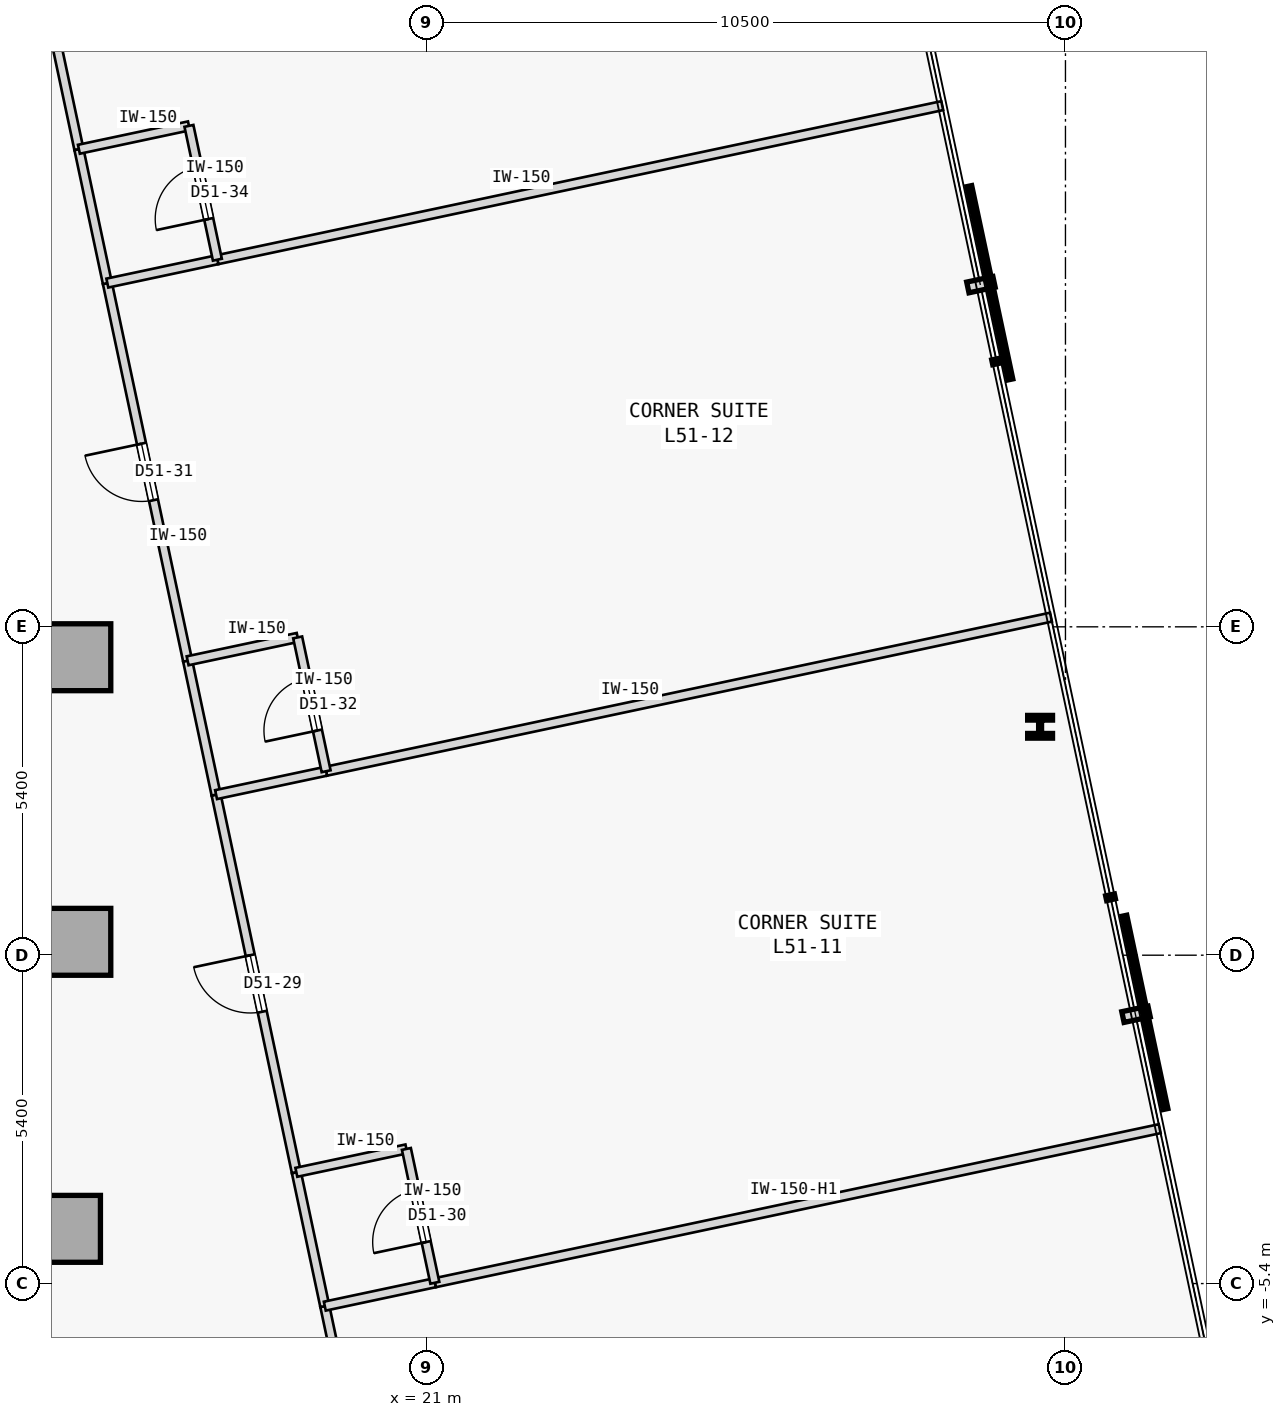
"""IFC4 building model, lengths in metres.
Left out: names, types, materials, properties, quantities, classifications, styles, units other than length and angle.
Written with IfcOpenShell. Run it as: python <this file> out.ifc"""

import sys

from ifc_helpers import new_model, si_unit, direction, frame, frame_2d, origin, origin_2d, place, context, subcontext, project, spatial, rectangle, i_section, extrude, element, fill, save


model = new_model("IFC4")
c1 = context("Model", 3, precision=1e-05, world=origin(), true_north=direction((0.0, 1.0)))
c2 = subcontext(c1, "Body", "Model", "MODEL_VIEW")
j1 = project(units=[si_unit("LENGTHUNIT", "METRE"), si_unit("PLANEANGLEUNIT", "RADIAN")], contexts=[c1])
p1 = place(None, origin())
s1 = spatial("IfcSite", under=j1, at=p1, CompositionType="ELEMENT")
p2 = place(p1, origin())
s2 = spatial("IfcBuilding", under=s1, at=p2, CompositionType="ELEMENT")
p3 = place(p2, frame((0.0, 0.0, 195.6)))
s3 = spatial("IfcBuildingStorey", under=s2, at=p3, CompositionType="ELEMENT", Elevation=195.6)
for number, where, z_axis, x_axis in (
    (1, (15.25, 4.9, 0.0), (0.0, 0.0, 1.0), (1.0, 0.0, 0.0)),
    (2, (15.25, 0.22, 0.0), (0.0, 0.0, 1.0), (1.0, 0.0, 0.0)),
    (3, (15.08, -4.5, 0.0), (0.0, 0.0, 1.0), (1.0, 0.0, 0.0)),
):
    element("IfcColumn", number, at=place(p3, frame(where, z_axis=z_axis, x_axis=x_axis)), inside=s3, PredefinedType="COLUMN", context=c2, shape_type="SweptSolid", body=[
        extrude(rectangle(XDim=1.1, YDim=1.1, at=origin_2d()), origin(), (0.0, 0.0, 1.0), 3.4),
    ])
p4 = place(p3, frame((31.083, 3.756, 0.0), z_axis=(0.0, 0.0, 1.0), x_axis=(1.0, 0.0, 0.0)))
e4 = element("IfcColumn", 4, at=p4, inside=s3, PredefinedType="COLUMN", context=c2, shape_type="SweptSolid", body=[
    extrude(i_section(OverallWidth=0.409, OverallDepth=0.374, WebThickness=0.048, FlangeThickness=0.077, FilletRadius=0.015, at=origin_2d()), origin(), (0.0, 0.0, 1.0), 3.4),
])
p5 = place(p3, frame((20.328, -10.515, 0.0), z_axis=(0.0, 0.0, 1.0), x_axis=(-0.207950868925, 0.97813927235, 0.0)))
e5 = element("IfcWall", 5, at=p5, inside=s3, PredefinedType="PARTITIONING", context=c2, shape_type="SweptSolid", body=[
    extrude(rectangle(XDim=4.85, YDim=0.15, at=frame_2d((2.425, 0.0))), origin(), (0.0, 0.0, 1.0), 3.175),
])
p6 = place(p5, frame((1.95, 0.0, 0.0)))
e6 = element("IfcOpeningElement", 6, at=p6, cuts=e5, PredefinedType="OPENING", context=c2, shape_type="SweptSolid", body=[
    extrude(rectangle(XDim=0.95, YDim=2.15, at=frame_2d((0.475, 1.075))), frame((0.0, 0.085, 0.0), z_axis=(0.0, -1.0, 0.0), x_axis=(1.0, 0.0, 0.0)), (0.0, 0.0, 1.0), 0.17),
])
p7 = place(p3, frame((18.852, -3.571, 0.0), z_axis=(0.0, 0.0, 1.0), x_axis=(-0.207879907349, 0.978154355979, 0.0)))
e7 = element("IfcWall", 7, at=p7, inside=s3, PredefinedType="PARTITIONING", context=c2, shape_type="SweptSolid", body=[
    extrude(rectangle(XDim=6.35, YDim=0.15, at=frame_2d((3.175, 0.0))), origin(), (0.0, 0.0, 1.0), 3.175),
])
p8 = place(p7, frame((2.7, 0.0, 0.0)))
e8 = element("IfcOpeningElement", 8, at=p8, cuts=e7, PredefinedType="OPENING", context=c2, shape_type="SweptSolid", body=[
    extrude(rectangle(XDim=0.95, YDim=2.15, at=frame_2d((0.475, 1.075))), frame((0.0, 0.085, 0.0), z_axis=(0.0, -1.0, 0.0), x_axis=(1.0, 0.0, 0.0)), (0.0, 0.0, 1.0), 0.17),
])
p9 = place(p3, frame((19.32, -5.771, 0.0), z_axis=(0.0, 0.0, 1.0), x_axis=(-0.207913264065, 0.978147266328, 0.0)))
e9 = element("IfcWall", 9, at=p9, inside=s3, PredefinedType="PARTITIONING", context=c2, shape_type="SweptSolid", body=[
    extrude(rectangle(XDim=2.25, YDim=0.15, at=frame_2d((1.125, 0.0))), origin(), (0.0, 0.0, 1.0), 3.175),
])
p10 = place(p3, frame((17.064, 4.841, 0.0), z_axis=(0.0, 0.0, 1.0), x_axis=(-0.207924511115, 0.978144875608, 0.0)))
e10 = element("IfcWall", 10, at=p10, inside=s3, PredefinedType="PARTITIONING", context=c2, shape_type="SweptSolid", body=[
    extrude(rectangle(XDim=6.35, YDim=0.15, at=frame_2d((3.175, 0.0))), origin(), (0.0, 0.0, 1.0), 3.175),
])
p11 = place(p10, frame((2.7, 0.0, 0.0)))
e11 = element("IfcOpeningElement", 11, at=p11, cuts=e10, PredefinedType="OPENING", context=c2, shape_type="SweptSolid", body=[
    extrude(rectangle(XDim=0.95, YDim=2.15, at=frame_2d((0.475, 1.075))), frame((0.0, 0.085, 0.0), z_axis=(0.0, -1.0, 0.0), x_axis=(1.0, 0.0, 0.0)), (0.0, 0.0, 1.0), 0.17),
])
p12 = place(p3, frame((17.532, 2.641, 0.0), z_axis=(0.0, 0.0, 1.0), x_axis=(-0.207913264065, 0.978147266328, 0.0)))
e12 = element("IfcWall", 12, at=p12, inside=s3, PredefinedType="PARTITIONING", context=c2, shape_type="SweptSolid", body=[
    extrude(rectangle(XDim=2.25, YDim=0.15, at=frame_2d((1.125, 0.0))), origin(), (0.0, 0.0, 1.0), 3.175),
])
p13 = place(p3, frame((15.276, 13.253, 0.0), z_axis=(0.0, 0.0, 1.0), x_axis=(-0.207924511115, 0.978144875608, 0.0)))
e13 = element("IfcWall", 13, at=p13, inside=s3, PredefinedType="PARTITIONING", context=c2, shape_type="SweptSolid", body=[
    extrude(rectangle(XDim=6.35, YDim=0.15, at=frame_2d((3.175, 0.0))), origin(), (0.0, 0.0, 1.0), 3.175),
])
p14 = place(p13, frame((2.7, 0.0, 0.0)))
e14 = element("IfcOpeningElement", 14, at=p14, cuts=e13, PredefinedType="OPENING", context=c2, shape_type="SweptSolid", body=[
    extrude(rectangle(XDim=0.95, YDim=2.15, at=frame_2d((0.475, 1.075))), frame((0.0, 0.085, 0.0), z_axis=(0.0, -1.0, 0.0), x_axis=(1.0, 0.0, 0.0)), (0.0, 0.0, 1.0), 0.17),
])
p15 = place(p3, frame((15.744, 11.052, 0.0), z_axis=(0.0, 0.0, 1.0), x_axis=(-0.207891197838, 0.978151956427, 0.0)))
e15 = element("IfcWall", 15, at=p15, inside=s3, PredefinedType="PARTITIONING", context=c2, shape_type="SweptSolid", body=[
    extrude(rectangle(XDim=2.25, YDim=0.15, at=frame_2d((1.125, 0.0))), origin(), (0.0, 0.0, 1.0), 3.175),
])
p16 = place(p3, frame((21.129, -5.387, 0.0), z_axis=(0.0, 0.0, 1.0), x_axis=(0.97814556055, 0.207921288896, 0.0)))
e16 = element("IfcWall", 16, at=p16, inside=s3, PredefinedType="PARTITIONING", context=c2, shape_type="SweptSolid", body=[
    extrude(rectangle(XDim=12.187, YDim=0.15, at=frame_2d((6.094, 0.0))), origin(), (0.0, 0.0, 1.0), 2.725),
])
p17 = place(p3, frame((19.32, -5.771, 0.0), z_axis=(0.0, 0.0, 1.0), x_axis=(0.978165892835, 0.207825614625, 0.0)))
e17 = element("IfcWall", 17, at=p17, inside=s3, PredefinedType="PARTITIONING", context=c2, shape_type="SweptSolid", body=[
    extrude(rectangle(XDim=1.85, YDim=0.15, at=frame_2d((0.925, 0.0))), origin(), (0.0, 0.0, 1.0), 3.175),
])
p18 = place(p3, frame((18.852, -3.571, 0.0), z_axis=(0.0, 0.0, 1.0), x_axis=(0.978139061018, 0.207951862966, 0.0)))
e18 = element("IfcWall", 18, at=p18, inside=s3, PredefinedType="PARTITIONING", context=c2, shape_type="SweptSolid", body=[
    extrude(rectangle(XDim=1.85, YDim=0.15, at=frame_2d((0.925, 0.0))), origin(), (0.0, 0.0, 1.0), 3.175),
])
p19 = place(p3, frame((21.129, -5.387, 0.0), z_axis=(0.0, 0.0, 1.0), x_axis=(-0.207891197838, 0.978151956427, 0.0)))
e19 = element("IfcWall", 19, at=p19, inside=s3, PredefinedType="PARTITIONING", context=c2, shape_type="SweptSolid", body=[
    extrude(rectangle(XDim=2.25, YDim=0.15, at=frame_2d((1.125, 0.0))), origin(), (0.0, 0.0, 1.0), 3.175),
])
p20 = place(p19, frame((0.685, 0.0, 0.0)))
e20 = element("IfcOpeningElement", 20, at=p20, cuts=e19, PredefinedType="OPENING", context=c2, shape_type="SweptSolid", body=[
    extrude(rectangle(XDim=0.88, YDim=2.15, at=frame_2d((0.44, 1.075))), frame((0.0, 0.085, 0.0), z_axis=(0.0, -1.0, 0.0), x_axis=(1.0, 0.0, 0.0)), (0.0, 0.0, 1.0), 0.17),
])
p21 = place(p3, frame((19.341, 3.025, 0.0), z_axis=(0.0, 0.0, 1.0), x_axis=(0.97814556055, 0.207921288896, 0.0)))
e21 = element("IfcWall", 21, at=p21, inside=s3, PredefinedType="PARTITIONING", context=c2, shape_type="SweptSolid", body=[
    extrude(rectangle(XDim=12.187, YDim=0.15, at=frame_2d((6.094, 0.0))), origin(), (0.0, 0.0, 1.0), 3.175),
])
p22 = place(p3, frame((17.532, 2.641, 0.0), z_axis=(0.0, 0.0, 1.0), x_axis=(0.978160192495, 0.207852442415, 0.0)))
e22 = element("IfcWall", 22, at=p22, inside=s3, PredefinedType="PARTITIONING", context=c2, shape_type="SweptSolid", body=[
    extrude(rectangle(XDim=1.85, YDim=0.15, at=frame_2d((0.925, 0.0))), origin(), (0.0, 0.0, 1.0), 3.175),
])
p23 = place(p3, frame((17.064, 4.841, 0.0), z_axis=(0.0, 0.0, 1.0), x_axis=(0.978133353907, 0.20797870558, 0.0)))
e23 = element("IfcWall", 23, at=p23, inside=s3, PredefinedType="PARTITIONING", context=c2, shape_type="SweptSolid", body=[
    extrude(rectangle(XDim=1.85, YDim=0.15, at=frame_2d((0.925, 0.0))), origin(), (0.0, 0.0, 1.0), 3.175),
])
p24 = place(p3, frame((19.341, 3.025, 0.0), z_axis=(0.0, 0.0, 1.0), x_axis=(-0.207891197838, 0.978151956427, 0.0)))
e24 = element("IfcWall", 24, at=p24, inside=s3, PredefinedType="PARTITIONING", context=c2, shape_type="SweptSolid", body=[
    extrude(rectangle(XDim=2.25, YDim=0.15, at=frame_2d((1.125, 0.0))), origin(), (0.0, 0.0, 1.0), 3.175),
])
p25 = place(p24, frame((0.685, 0.0, 0.0)))
e25 = element("IfcOpeningElement", 25, at=p25, cuts=e24, PredefinedType="OPENING", context=c2, shape_type="SweptSolid", body=[
    extrude(rectangle(XDim=0.88, YDim=2.15, at=frame_2d((0.44, 1.075))), frame((0.0, 0.085, 0.0), z_axis=(0.0, -1.0, 0.0), x_axis=(1.0, 0.0, 0.0)), (0.0, 0.0, 1.0), 0.17),
])
p26 = place(p3, frame((17.553, 11.437, 0.0), z_axis=(0.0, 0.0, 1.0), x_axis=(0.97814556055, 0.207921288896, 0.0)))
e26 = element("IfcWall", 26, at=p26, inside=s3, PredefinedType="PARTITIONING", context=c2, shape_type="SweptSolid", body=[
    extrude(rectangle(XDim=12.187, YDim=0.15, at=frame_2d((6.094, 0.0))), origin(), (0.0, 0.0, 1.0), 3.175),
])
for number, where, z_axis, x_axis in (
    (27, (15.744, 11.052, 0.0), (0.0, 0.0, 1.0), (0.978, 0.208, 0.0)),
    (28, (15.276, 13.253, 0.0), (0.0, 0.0, 1.0), (0.978, 0.208, 0.0)),
):
    element("IfcWall", number, at=place(p3, frame(where, z_axis=z_axis, x_axis=x_axis)), inside=s3, PredefinedType="PARTITIONING", context=c2, shape_type="SweptSolid", body=[
        extrude(rectangle(XDim=1.85, YDim=0.15, at=frame_2d((0.925, 0.0))), origin(), (0.0, 0.0, 1.0), 3.175),
    ])
p27 = place(p3, frame((17.553, 11.437, 0.0), z_axis=(0.0, 0.0, 1.0), x_axis=(-0.207891197838, 0.978151956427, 0.0)))
e29 = element("IfcWall", 29, at=p27, inside=s3, PredefinedType="PARTITIONING", context=c2, shape_type="SweptSolid", body=[
    extrude(rectangle(XDim=2.25, YDim=0.15, at=frame_2d((1.125, 0.0))), origin(), (0.0, 0.0, 1.0), 3.175),
])
p28 = place(p27, frame((0.685, 0.0, 0.0)))
e30 = element("IfcOpeningElement", 30, at=p28, cuts=e29, PredefinedType="OPENING", context=c2, shape_type="SweptSolid", body=[
    extrude(rectangle(XDim=0.88, YDim=2.15, at=frame_2d((0.44, 1.075))), frame((0.0, 0.085, 0.0), z_axis=(0.0, -1.0, 0.0), x_axis=(1.0, 0.0, 0.0)), (0.0, 0.0, 1.0), 0.17),
])
p29 = place(p8, origin())
e31 = element("IfcDoor", 31, at=p29, inside=s3, OperationType="SINGLE_SWING_RIGHT", PredefinedType="DOOR", context=c2, shape_type="SweptSolid", body=[
    extrude(rectangle(XDim=0.95, YDim=2.15, at=frame_2d((0.475, 1.075))), frame((0.0, 0.025, 0.0), z_axis=(0.0, -1.0, 0.0), x_axis=(1.0, 0.0, 0.0)), (0.0, 0.0, 1.0), 0.05),
])
fill(e8, e31)
p30 = place(p20, origin())
e32 = element("IfcDoor", 32, at=p30, inside=s3, OperationType="SINGLE_SWING_LEFT", PredefinedType="DOOR", context=c2, shape_type="SweptSolid", body=[
    extrude(rectangle(XDim=0.88, YDim=2.15, at=frame_2d((0.44, 1.075))), frame((0.0, 0.025, 0.0), z_axis=(0.0, -1.0, 0.0), x_axis=(1.0, 0.0, 0.0)), (0.0, 0.0, 1.0), 0.05),
])
fill(e20, e32)
p31 = place(p11, origin())
e33 = element("IfcDoor", 33, at=p31, inside=s3, OperationType="SINGLE_SWING_RIGHT", PredefinedType="DOOR", context=c2, shape_type="SweptSolid", body=[
    extrude(rectangle(XDim=0.95, YDim=2.15, at=frame_2d((0.475, 1.075))), frame((0.0, 0.025, 0.0), z_axis=(0.0, -1.0, 0.0), x_axis=(1.0, 0.0, 0.0)), (0.0, 0.0, 1.0), 0.05),
])
fill(e11, e33)
p32 = place(p25, origin())
e34 = element("IfcDoor", 34, at=p32, inside=s3, OperationType="SINGLE_SWING_LEFT", PredefinedType="DOOR", context=c2, shape_type="SweptSolid", body=[
    extrude(rectangle(XDim=0.88, YDim=2.15, at=frame_2d((0.44, 1.075))), frame((0.0, 0.025, 0.0), z_axis=(0.0, -1.0, 0.0), x_axis=(1.0, 0.0, 0.0)), (0.0, 0.0, 1.0), 0.05),
])
fill(e25, e34)
p33 = place(p28, origin())
e35 = element("IfcDoor", 35, at=p33, inside=s3, OperationType="SINGLE_SWING_LEFT", PredefinedType="DOOR", context=c2, shape_type="SweptSolid", body=[
    extrude(rectangle(XDim=0.88, YDim=2.15, at=frame_2d((0.44, 1.075))), frame((0.0, 0.025, 0.0), z_axis=(0.0, -1.0, 0.0), x_axis=(1.0, 0.0, 0.0)), (0.0, 0.0, 1.0), 0.05),
])
fill(e30, e35)
save(model, sys.argv[1])
